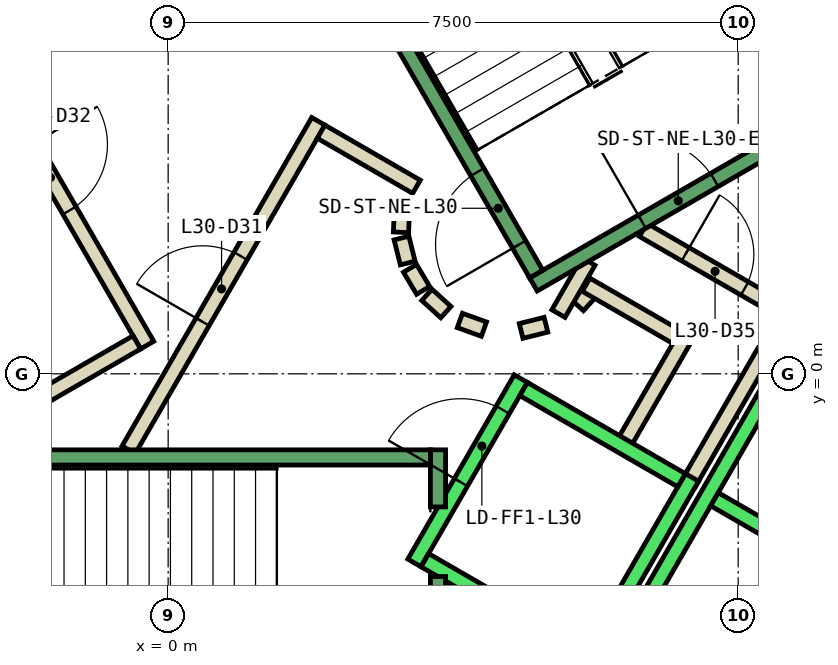
"""IFC4 building model, lengths in metres.
Left out: names, types, materials, properties, quantities, classifications, styles, units other than length and angle.
Written with IfcOpenShell. Run it as: python <this file> out.ifc"""

import sys

from ifc_helpers import new_model, si_unit, direction, frame, frame_2d, origin, place, context, subcontext, project, spatial, rectangle, extrude, element, fill, save


model = new_model("IFC4")
c1 = context("Model", 3, precision=1e-05, world=origin(), true_north=direction((0.0, 1.0)))
c2 = subcontext(c1, "Body", "Model", "MODEL_VIEW")
j1 = project(units=[si_unit("LENGTHUNIT", "METRE"), si_unit("PLANEANGLEUNIT", "RADIAN")], contexts=[c1])
p1 = place(None, origin())
s1 = spatial("IfcSite", under=j1, at=p1, CompositionType="ELEMENT")
p2 = place(p1, origin())
s2 = spatial("IfcBuilding", under=s1, at=p2, CompositionType="ELEMENT")
p3 = place(p2, frame((0.0, 0.0, 138.2)))
s3 = spatial("IfcBuildingStorey", under=s2, at=p3, CompositionType="ELEMENT", Elevation=138.2)
p4 = place(p3, frame((5.39, 0.898, 0.0), z_axis=(0.0, 0.0, 1.0), x_axis=(0.673828488714, 0.738887791073, 0.0)))
e1 = element("IfcWall", 1, at=p4, inside=s3, PredefinedType="PARTITIONING", context=c2, shape_type="SweptSolid", body=[
    extrude(rectangle(XDim=0.263, YDim=0.2, at=frame_2d((0.131, 0.0))), origin(), (0.0, 0.0, 1.0), 3.8),
])
p5 = place(p3, frame((5.499, 1.172, 0.0), z_axis=(0.0, 0.0, 1.0), x_axis=(0.866333505267, -0.499465972466, 0.0)))
e2 = element("IfcWall", 2, at=p5, inside=s3, PredefinedType="PARTITIONING", context=c2, shape_type="SweptSolid", body=[
    extrude(rectangle(XDim=1.374, YDim=0.2, at=frame_2d((0.687, 0.0))), origin(), (0.0, 0.0, 1.0), 3.8),
])
p6 = place(p3, frame((6.826, 0.522, 0.0), z_axis=(0.0, 0.0, 1.0), x_axis=(-0.500016722714, -0.866015748706, 0.0)))
e3 = element("IfcWall", 3, at=p6, inside=s3, PredefinedType="PARTITIONING", context=c2, shape_type="SweptSolid", body=[
    extrude(rectangle(XDim=1.7, YDim=0.2, at=frame_2d((0.85, 0.0))), origin(), (0.0, 0.0, 1.0), 3.8),
])
p7 = place(p3, frame((6.25, 1.894, 0.0), z_axis=(0.0, 0.0, 1.0), x_axis=(0.866043184279, -0.499969202016, 0.0)))
e4 = element("IfcWall", 4, at=p7, inside=s3, PredefinedType="PARTITIONING", context=c2, shape_type="SweptSolid", body=[
    extrude(rectangle(XDim=2.084, YDim=0.2, at=frame_2d((1.042, 0.0))), origin(), (0.0, 0.0, 1.0), 3.8),
])
p8 = place(p7, frame((0.642, 0.0, 0.0)))
e5 = element("IfcOpeningElement", 5, at=p8, cuts=e4, PredefinedType="OPENING", context=c2, shape_type="SweptSolid", body=[
    extrude(rectangle(XDim=0.9, YDim=2.1, at=frame_2d((0.45, 1.05))), frame((0.0, 0.11, 0.0), z_axis=(0.0, -1.0, 0.0), x_axis=(1.0, 0.0, 0.0)), (0.0, 0.0, 1.0), 0.22),
])
p9 = place(p3, frame((8.192, 0.888, 0.0), z_axis=(0.0, 0.0, 1.0), x_axis=(-0.499940625693, -0.866059680843, 0.0)))
e6 = element("IfcWall", 6, at=p9, inside=s3, PredefinedType="PARTITIONING", context=c2, shape_type="SweptSolid", body=[
    extrude(rectangle(XDim=2.68, YDim=0.2, at=frame_2d((1.34, 0.0))), origin(), (0.0, 0.0, 1.0), 3.8),
])
p10 = place(p3, frame((5.135, 0.793, 0.0), z_axis=(0.0, 0.0, 1.0), x_axis=(0.499526442893, 0.866298639529, 0.0)))
e7 = element("IfcWall", 7, at=p10, inside=s3, PredefinedType="PARTITIONING", context=c2, shape_type="SweptSolid", body=[
    extrude(rectangle(XDim=0.791, YDim=0.2, at=frame_2d((0.396, 0.0))), origin(), (0.0, 0.0, 1.0), 3.8),
])
p11 = place(p3, frame((-0.52, -1.0, 0.0), z_axis=(0.0, 0.0, 1.0), x_axis=(0.50011622646, 0.865958290007, 0.0)))
e8 = element("IfcWall", 8, at=p11, inside=s3, PredefinedType="PARTITIONING", context=c2, shape_type="SweptSolid", body=[
    extrude(rectangle(XDim=4.991, YDim=0.2, at=frame_2d((2.496, 0.0))), origin(), (0.0, 0.0, 1.0), 3.8),
])
p12 = place(p11, frame((1.945, 0.0, 0.0)))
e9 = element("IfcOpeningElement", 9, at=p12, cuts=e8, PredefinedType="OPENING", context=c2, shape_type="SweptSolid", body=[
    extrude(rectangle(XDim=1.0, YDim=2.1, at=frame_2d((0.5, 1.05))), frame((0.0, 0.11, 0.0), z_axis=(0.0, -1.0, 0.0), x_axis=(1.0, 0.0, 0.0)), (0.0, 0.0, 1.0), 0.22),
])
p13 = place(p3, frame((2.012, 3.186, 0.0), z_axis=(0.0, 0.0, 1.0), x_axis=(0.865891012941, -0.500232699559, 0.0)))
e10 = element("IfcWall", 10, at=p13, inside=s3, PredefinedType="PARTITIONING", context=c2, shape_type="SweptSolid", body=[
    extrude(rectangle(XDim=1.449, YDim=0.2, at=frame_2d((0.725, 0.0))), origin(), (0.0, 0.0, 1.0), 3.8),
])
p14 = place(p3, frame((3.079, 2.199, 0.0), z_axis=(0.0, 0.0, 1.0), x_axis=(-0.047771483479, -0.998858290933, 0.0)))
e11 = element("IfcWall", 11, at=p14, inside=s3, PredefinedType="PARTITIONING", context=c2, shape_type="SweptSolid", body=[
    extrude(rectangle(XDim=0.337, YDim=0.2, at=frame_2d((0.169, 0.0))), origin(), (0.0, 0.0, 1.0), 3.8),
])
p15 = place(p3, frame((3.07, 1.786, 0.0), z_axis=(0.0, 0.0, 1.0), x_axis=(0.242705583207, -0.970099994784, 0.0)))
e12 = element("IfcWall", 12, at=p15, inside=s3, PredefinedType="PARTITIONING", context=c2, shape_type="SweptSolid", body=[
    extrude(rectangle(XDim=0.338, YDim=0.2, at=frame_2d((0.169, 0.0))), origin(), (0.0, 0.0, 1.0), 3.8),
])
for number, where, z_axis, x_axis in (
    (13, (3.182, 1.388, 0.0), (0.0, 0.0, 1.0), (0.512, -0.859, 0.0)),
    (14, (3.404, 1.039, 0.0), (0.0, 0.0, 1.0), (0.74, -0.672, 0.0)),
):
    element("IfcWall", number, at=place(p3, frame(where, z_axis=z_axis, x_axis=x_axis)), inside=s3, PredefinedType="PARTITIONING", context=c2, shape_type="SweptSolid", body=[
        extrude(rectangle(XDim=0.338, YDim=0.2, at=frame_2d((0.169, 0.0))), origin(), (0.0, 0.0, 1.0), 3.8),
    ])
p16 = place(p3, frame((3.838, 0.702, 0.0), z_axis=(0.0, 0.0, 1.0), x_axis=(0.941035081519, -0.338308993895, 0.0)))
e15 = element("IfcWall", 15, at=p16, inside=s3, PredefinedType="PARTITIONING", context=c2, shape_type="SweptSolid", body=[
    extrude(rectangle(XDim=0.337, YDim=0.2, at=frame_2d((0.168, 0.0))), origin(), (0.0, 0.0, 1.0), 3.8),
])
p17 = place(p3, frame((4.644, 0.564, 0.0), z_axis=(0.0, 0.0, 1.0), x_axis=(0.969929076366, 0.243387729394, 0.0)))
e16 = element("IfcWall", 16, at=p17, inside=s3, PredefinedType="PARTITIONING", context=c2, shape_type="SweptSolid", body=[
    extrude(rectangle(XDim=0.337, YDim=0.2, at=frame_2d((0.168, 0.0))), origin(), (0.0, 0.0, 1.0), 3.8),
])
p18 = place(p3, frame((-2.771, 4.7, 0.0), z_axis=(0.0, 0.0, 1.0), x_axis=(0.499969479948, -0.866043023828, 0.0)))
e17 = element("IfcWall", 17, at=p18, inside=s3, PredefinedType="PARTITIONING", context=c2, shape_type="SweptSolid", body=[
    extrude(rectangle(XDim=4.99, YDim=0.2, at=frame_2d((2.495, 0.0))), origin(), (0.0, 0.0, 1.0), 3.8),
])
p19 = place(p18, frame((1.945, 0.0, 0.0)))
e18 = element("IfcOpeningElement", 18, at=p19, cuts=e17, PredefinedType="OPENING", context=c2, shape_type="SweptSolid", body=[
    extrude(rectangle(XDim=1.0, YDim=2.1, at=frame_2d((0.5, 1.05))), frame((0.0, 0.11, 0.0), z_axis=(0.0, -1.0, 0.0), x_axis=(1.0, 0.0, 0.0)), (0.0, 0.0, 1.0), 0.22),
])
p20 = place(p3, frame((-0.412, 0.414, 0.0), z_axis=(0.0, 0.0, 1.0), x_axis=(-0.866017369001, -0.500013916395, 0.0)))
e19 = element("IfcWall", 19, at=p20, inside=s3, PredefinedType="PARTITIONING", context=c2, shape_type="SweptSolid", body=[
    extrude(rectangle(XDim=1.45, YDim=0.2, at=frame_2d((0.725, 0.0))), origin(), (0.0, 0.0, 1.0), 3.8),
])
p21 = place(p3, frame((3.24, -2.488, 0.0), z_axis=(0.0, 0.0, 1.0), x_axis=(0.49994636267, 0.866056369097, 0.0)))
e20 = element("IfcWall", 20, at=p21, inside=s3, PredefinedType="STANDARD", context=c2, shape_type="SweptSolid", body=[
    extrude(rectangle(XDim=2.8, YDim=0.2, at=frame_2d((1.4, 0.0))), origin(), (0.0, 0.0, 1.0), 3.8),
])
p22 = place(p21, frame((1.225, 0.0, 0.0)))
e21 = element("IfcOpeningElement", 21, at=p22, cuts=e20, PredefinedType="OPENING", context=c2, shape_type="SweptSolid", body=[
    extrude(rectangle(XDim=1.1, YDim=2.1, at=frame_2d((0.55, 1.05))), frame((0.0, 0.11, 0.0), z_axis=(0.0, -1.0, 0.0), x_axis=(1.0, 0.0, 0.0)), (0.0, 0.0, 1.0), 0.22),
])
p23 = place(p3, frame((5.492, -3.788, 0.0), z_axis=(0.0, 0.0, 1.0), x_axis=(0.500011755427, 0.866018616679, 0.0)))
e22 = element("IfcWall", 22, at=p23, inside=s3, PredefinedType="STANDARD", context=c2, shape_type="SweptSolid", body=[
    extrude(rectangle(XDim=2.8, YDim=0.2, at=frame_2d((1.4, 0.0))), origin(), (0.0, 0.0, 1.0), 3.8),
])
p24 = place(p3, frame((3.377, -2.452, 0.0), z_axis=(0.0, 0.0, 1.0), x_axis=(0.865955154139, -0.50012165622, 0.0)))
e23 = element("IfcWall", 23, at=p24, inside=s3, PredefinedType="STANDARD", context=c2, shape_type="SweptSolid", body=[
    extrude(rectangle(XDim=2.4, YDim=0.2, at=frame_2d((1.2, 0.0))), origin(), (0.0, 0.0, 1.0), 3.8),
])
p25 = place(p3, frame((4.677, -0.2, 0.0), z_axis=(0.0, 0.0, 1.0), x_axis=(0.865973769406, -0.500089422704, 0.0)))
e24 = element("IfcWall", 24, at=p25, inside=s3, PredefinedType="STANDARD", context=c2, shape_type="SweptSolid", body=[
    extrude(rectangle(XDim=2.399, YDim=0.2, at=frame_2d((1.2, 0.0))), origin(), (0.0, 0.0, 1.0), 3.8),
])
p26 = place(p3, frame((4.451, -6.19, 0.0), z_axis=(0.0, 0.0, 1.0), x_axis=(0.50000090737, 0.866024879913, 0.0)))
e25 = element("IfcWall", 25, at=p26, inside=s3, PredefinedType="STANDARD", context=c2, shape_type="SweptSolid", body=[
    extrude(rectangle(XDim=10.6, YDim=0.2, at=frame_2d((5.3, 0.0))), origin(), (0.0, 0.0, 1.0), 3.8),
])
p27 = place(p3, frame((7.188, -1.65, 0.0), z_axis=(0.0, 0.0, 1.0), x_axis=(0.866022959057, -0.500004234368, 0.0)))
e26 = element("IfcWall", 26, at=p27, inside=s3, PredefinedType="STANDARD", context=c2, shape_type="SweptSolid", body=[
    extrude(rectangle(XDim=2.5, YDim=0.2, at=frame_2d((1.25, 0.0))), origin(), (0.0, 0.0, 1.0), 3.8),
])
p28 = place(p3, frame((3.55, -2.667, 0.0), z_axis=(0.0, 0.0, 1.0), x_axis=(0.0, -1.0, 0.0)))
e27 = element("IfcWall", 27, at=p28, inside=s3, PredefinedType="STANDARD", context=c2, shape_type="SweptSolid", body=[
    extrude(rectangle(XDim=2.733, YDim=0.2, at=frame_2d((1.366, 0.0))), origin(), (0.0, 0.0, 1.0), 3.8),
])
p29 = place(p3, frame((3.55, -1.0, 0.0), z_axis=(0.0, 0.0, 1.0), x_axis=(0.0, -1.0, 0.0)))
e28 = element("IfcWall", 28, at=p29, inside=s3, PredefinedType="STANDARD", context=c2, shape_type="SweptSolid", body=[
    extrude(rectangle(XDim=0.751, YDim=0.2, at=frame_2d((0.375, 0.0))), origin(), (0.0, 0.0, 1.0), 3.8),
])
p30 = place(p3, frame((-3.45, -1.1, 0.0), z_axis=(0.0, 0.0, 1.0), x_axis=(1.0, 0.0, 0.0)))
e29 = element("IfcWall", 29, at=p30, inside=s3, PredefinedType="STANDARD", context=c2, shape_type="SweptSolid", body=[
    extrude(rectangle(XDim=6.9, YDim=0.2, at=frame_2d((3.45, 0.0))), origin(), (0.0, 0.0, 1.0), 3.8),
])
p31 = place(p30, frame((0.45, 0.0, 0.0)))
e30 = element("IfcOpeningElement", 30, at=p31, cuts=e29, PredefinedType="OPENING", context=c2, shape_type="SweptSolid", body=[
    extrude(rectangle(XDim=1.1, YDim=2.2, at=frame_2d((0.55, 1.1))), frame((0.0, 0.11, 0.0), z_axis=(0.0, -1.0, 0.0), x_axis=(1.0, 0.0, 0.0)), (0.0, 0.0, 1.0), 0.22),
])
p32 = place(p3, frame((4.806, 1.176, 0.0), z_axis=(0.0, 0.0, 1.0), x_axis=(0.866059941101, 0.499940174841, 0.0)))
e31 = element("IfcWall", 31, at=p32, inside=s3, PredefinedType="STANDARD", context=c2, shape_type="SweptSolid", body=[
    extrude(rectangle(XDim=4.4, YDim=0.2, at=frame_2d((2.2, 0.0))), origin(), (0.0, 0.0, 1.0), 3.8),
])
p33 = place(p32, frame((1.65, 0.0, 0.0)))
e32 = element("IfcOpeningElement", 32, at=p33, cuts=e31, PredefinedType="OPENING", context=c2, shape_type="SweptSolid", body=[
    extrude(rectangle(XDim=1.1, YDim=2.2, at=frame_2d((0.55, 1.1))), frame((0.0, 0.11, 0.0), z_axis=(0.0, -1.0, 0.0), x_axis=(1.0, 0.0, 0.0)), (0.0, 0.0, 1.0), 0.22),
])
p34 = place(p3, frame((4.843, 1.312, 0.0), z_axis=(0.0, 0.0, 1.0), x_axis=(-0.499963383562, 0.866046543262, 0.0)))
e33 = element("IfcWall", 33, at=p34, inside=s3, PredefinedType="STANDARD", context=c2, shape_type="SweptSolid", body=[
    extrude(rectangle(XDim=6.9, YDim=0.2, at=frame_2d((3.45, 0.0))), origin(), (0.0, 0.0, 1.0), 3.8),
])
p35 = place(p34, frame((0.45, 0.0, 0.0)))
e34 = element("IfcOpeningElement", 34, at=p35, cuts=e33, PredefinedType="OPENING", context=c2, shape_type="SweptSolid", body=[
    extrude(rectangle(XDim=1.1, YDim=2.2, at=frame_2d((0.55, 1.1))), frame((0.0, 0.11, 0.0), z_axis=(0.0, -1.0, 0.0), x_axis=(1.0, 0.0, 0.0)), (0.0, 0.0, 1.0), 0.22),
])
p36 = place(p3, frame((8.48, 3.412, 0.0), z_axis=(0.0, 0.0, 1.0), x_axis=(-0.499978703459, 0.866037698999, 0.0)))
e35 = element("IfcWall", 35, at=p36, inside=s3, PredefinedType="STANDARD", context=c2, shape_type="SweptSolid", body=[
    extrude(rectangle(XDim=6.9, YDim=0.2, at=frame_2d((3.45, 0.0))), origin(), (0.0, 0.0, 1.0), 3.8),
])
p37 = place(p3, frame((-1.393, 7.288, 0.0), z_axis=(0.0, 0.0, 1.0), x_axis=(-0.499963383562, -0.866046543262, 0.0)))
e36 = element("IfcWall", 36, at=p37, inside=s3, PredefinedType="STANDARD", context=c2, shape_type="SweptSolid", body=[
    extrude(rectangle(XDim=6.9, YDim=0.2, at=frame_2d((3.45, 0.0))), origin(), (0.0, 0.0, 1.0), 3.8),
])
p38 = place(p37, frame((0.45, 0.0, 0.0)))
e37 = element("IfcOpeningElement", 37, at=p38, cuts=e36, PredefinedType="OPENING", context=c2, shape_type="SweptSolid", body=[
    extrude(rectangle(XDim=1.1, YDim=2.2, at=frame_2d((0.55, 1.1))), frame((0.0, 0.11, 0.0), z_axis=(0.0, -1.0, 0.0), x_axis=(1.0, 0.0, 0.0)), (0.0, 0.0, 1.0), 0.22),
])
p39 = place(p12, origin())
e38 = element("IfcDoor", 38, at=p39, inside=s3, OperationType="SINGLE_SWING_LEFT", PredefinedType="DOOR", context=c2, shape_type="SweptSolid", body=[
    extrude(rectangle(XDim=1.0, YDim=2.1, at=frame_2d((0.5, 1.05))), frame((0.0, 0.025, 0.0), z_axis=(0.0, -1.0, 0.0), x_axis=(1.0, 0.0, 0.0)), (0.0, 0.0, 1.0), 0.05),
])
fill(e9, e38)
p40 = place(p19, origin())
e39 = element("IfcDoor", 39, at=p40, inside=s3, OperationType="SINGLE_SWING_RIGHT", PredefinedType="DOOR", context=c2, shape_type="SweptSolid", body=[
    extrude(rectangle(XDim=1.0, YDim=2.1, at=frame_2d((0.5, 1.05))), frame((0.0, 0.025, 0.0), z_axis=(0.0, -1.0, 0.0), x_axis=(1.0, 0.0, 0.0)), (0.0, 0.0, 1.0), 0.05),
])
fill(e18, e39)
p41 = place(p8, origin())
e40 = element("IfcDoor", 40, at=p41, inside=s3, OperationType="SINGLE_SWING_LEFT", PredefinedType="DOOR", context=c2, shape_type="SweptSolid", body=[
    extrude(rectangle(XDim=0.9, YDim=2.1, at=frame_2d((0.45, 1.05))), frame((0.0, 0.025, 0.0), z_axis=(0.0, -1.0, 0.0), x_axis=(1.0, 0.0, 0.0)), (0.0, 0.0, 1.0), 0.05),
])
fill(e5, e40)
p42 = place(p22, origin())
e41 = element("IfcDoor", 41, at=p42, inside=s3, OperationType="SLIDING_TO_LEFT", PredefinedType="DOOR", context=c2, shape_type="SweptSolid", body=[
    extrude(rectangle(XDim=1.1, YDim=2.1, at=frame_2d((0.55, 1.05))), frame((0.0, 0.025, 0.0), z_axis=(0.0, -1.0, 0.0), x_axis=(1.0, 0.0, 0.0)), (0.0, 0.0, 1.0), 0.05),
])
fill(e21, e41)
p43 = place(p35, origin())
e42 = element("IfcDoor", 42, at=p43, inside=s3, OperationType="SINGLE_SWING_LEFT", PredefinedType="DOOR", context=c2, shape_type="SweptSolid", body=[
    extrude(rectangle(XDim=1.1, YDim=2.2, at=frame_2d((0.55, 1.1))), frame((0.0, 0.025, 0.0), z_axis=(0.0, -1.0, 0.0), x_axis=(1.0, 0.0, 0.0)), (0.0, 0.0, 1.0), 0.05),
])
fill(e34, e42)
p44 = place(p33, origin())
e43 = element("IfcDoor", 43, at=p44, inside=s3, OperationType="SINGLE_SWING_LEFT", PredefinedType="DOOR", context=c2, shape_type="SweptSolid", body=[
    extrude(rectangle(XDim=1.1, YDim=2.2, at=frame_2d((0.55, 1.1))), frame((0.0, 0.025, 0.0), z_axis=(0.0, -1.0, 0.0), x_axis=(1.0, 0.0, 0.0)), (0.0, 0.0, 1.0), 0.05),
])
fill(e32, e43)
save(model, sys.argv[1])
